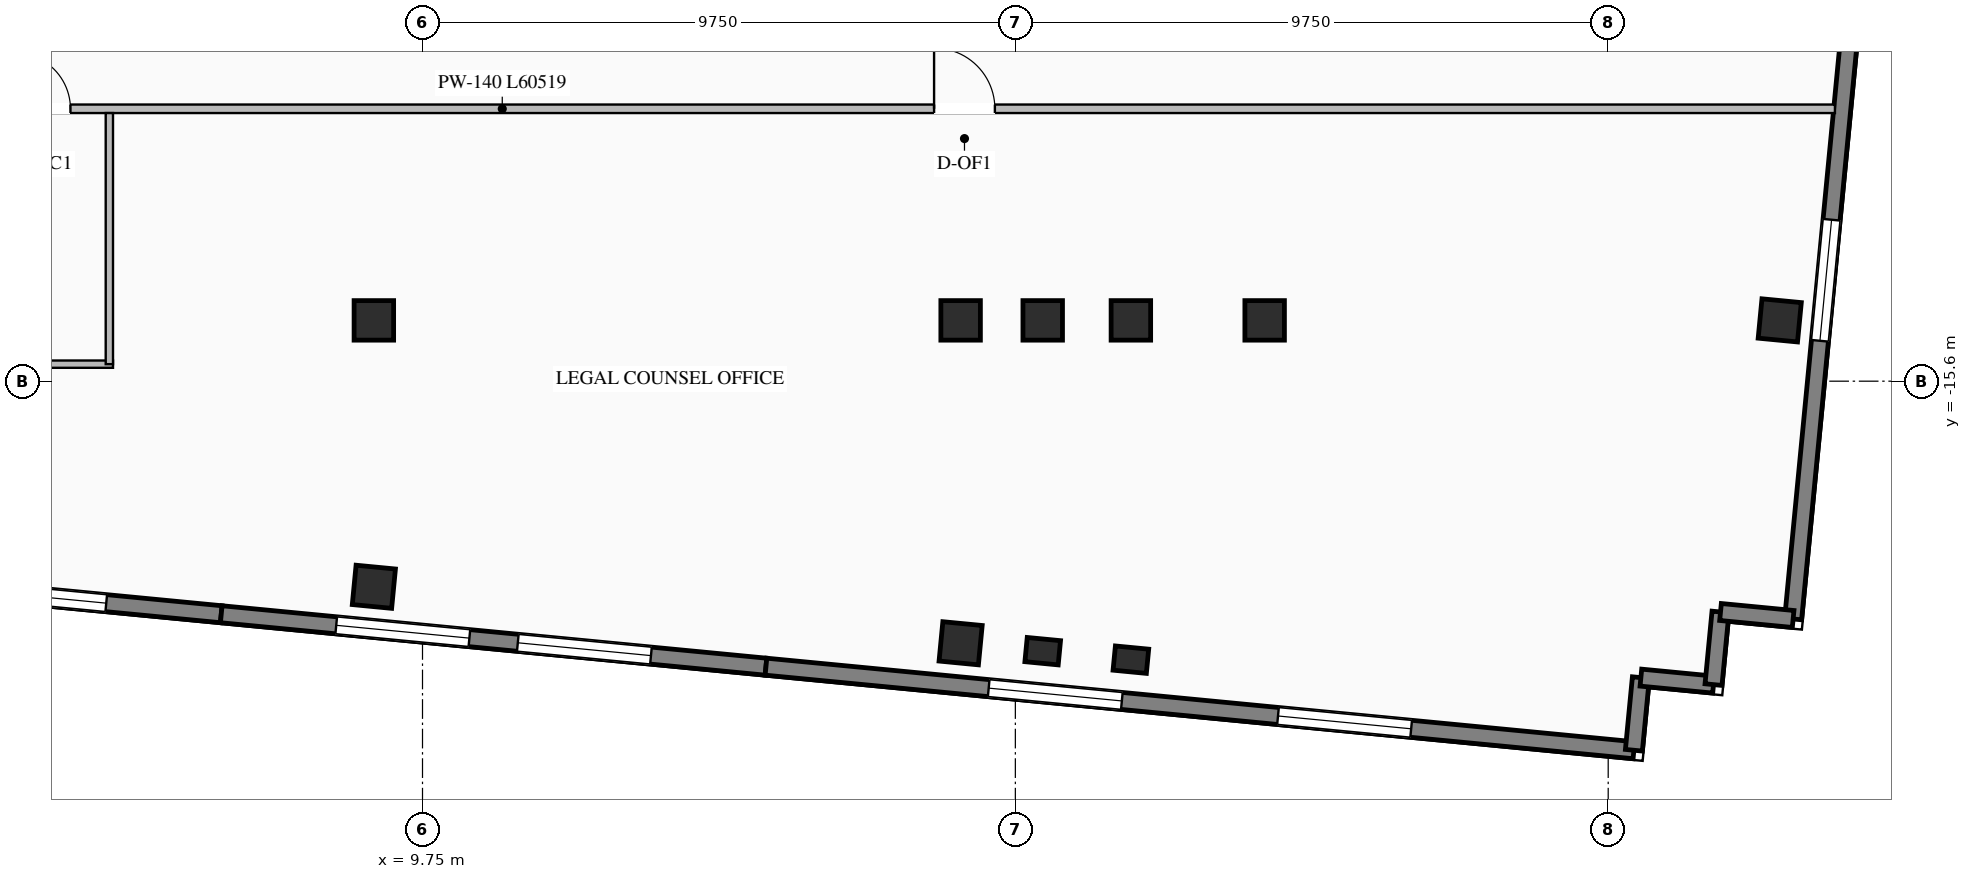
"""IFC4 building model, lengths in metres.
Left out: names, types, materials, properties, quantities, classifications, styles, units other than length and angle.
Written with IfcOpenShell. Run it as: python <this file> out.ifc"""

import sys

from ifc_helpers import new_model, si_unit, direction, frame, frame_2d, origin, origin_2d, place, context, subcontext, project, spatial, rectangle, i_section, extrude, element, fill, save


model = new_model("IFC4")
c1 = context("Model", 3, precision=1e-05, world=origin(), true_north=direction((0.0, 1.0)))
c2 = subcontext(c1, "Body", "Model", "MODEL_VIEW")
j1 = project(units=[si_unit("LENGTHUNIT", "METRE"), si_unit("PLANEANGLEUNIT", "RADIAN")], contexts=[c1])
p1 = place(None, origin())
s1 = spatial("IfcSite", under=j1, at=p1, CompositionType="ELEMENT")
p2 = place(p1, origin())
s2 = spatial("IfcBuilding", under=s1, at=p2, CompositionType="ELEMENT")
p3 = place(p2, frame((0.0, 0.0, 156.2)))
s3 = spatial("IfcBuildingStorey", under=s2, at=p3, CompositionType="ELEMENT", Elevation=156.2)
for number, where, z_axis, x_axis in (
    (1, (8.95, -14.6, 0.0), (0.0, 0.0, 1.0), (1.0, 0.0, 0.0)),
    (2, (18.6, -14.6, 0.0), (0.0, 0.0, 1.0), (1.0, 0.0, 0.0)),
    (3, (19.95, -14.6, 0.0), (0.0, 0.0, 1.0), (1.0, 0.0, 0.0)),
    (4, (21.4, -14.6, 0.0), (0.0, 0.0, 1.0), (1.0, 0.0, 0.0)),
    (5, (23.6, -14.6, 0.0), (0.0, 0.0, 1.0), (1.0, 0.0, 0.0)),
):
    element("IfcColumn", number, at=place(p3, frame(where, z_axis=z_axis, x_axis=x_axis)), inside=s3, PredefinedType="COLUMN", context=c2, shape_type="SweptSolid", body=[
        extrude(i_section(OverallWidth=0.65, OverallDepth=0.65, WebThickness=0.028, FlangeThickness=0.04, at=origin_2d()), origin(), (0.0, 0.0, 1.0), 4.2),
    ])
for number, where, z_axis, x_axis in (
    (6, (8.95, -18.981, -0.28), (0.0, 0.0, 1.0), (0.995, -0.096, 0.0)),
    (7, (18.6, -19.911, -0.28), (0.0, 0.0, 1.0), (0.995, -0.096, 0.0)),
    (8, (32.071, -14.6, -0.28), (0.0, 0.0, 1.0), (0.995, -0.096, 0.0)),
):
    element("IfcColumn", number, at=place(p3, frame(where, z_axis=z_axis, x_axis=x_axis)), inside=s3, PredefinedType="COLUMN", context=c2, shape_type="SweptSolid", body=[
        extrude(i_section(OverallWidth=0.65, OverallDepth=0.65, WebThickness=0.028, FlangeThickness=0.04, at=origin_2d()), origin(), (0.0, 0.0, 1.0), 4.48),
    ])
for number, where, z_axis, x_axis in (
    (9, (19.95, -20.041, -0.28), (0.0, 0.0, 1.0), (0.995, -0.096, 0.0)),
    (10, (21.4, -20.18, -0.28), (0.0, 0.0, 1.0), (0.995, -0.096, 0.0)),
):
    element("IfcColumn", number, at=place(p3, frame(where, z_axis=z_axis, x_axis=x_axis)), inside=s3, PredefinedType="PILASTER", context=c2, shape_type="SweptSolid", body=[
        extrude(rectangle(XDim=0.55, YDim=0.4, at=origin_2d()), origin(), (0.0, 0.0, 1.0), 4.48),
    ])
p4 = place(p3, frame((6.44, -19.433, 0.0), z_axis=(0.0, 0.0, 1.0), x_axis=(-0.995396794462, 0.09583956164, 0.0)))
e11 = element("IfcWall", 11, at=p4, inside=s3, PredefinedType="STANDARD", context=c2, shape_type="SweptSolid", body=[
    extrude(rectangle(XDim=9.0, YDim=0.28, at=frame_2d((4.5, 0.0))), origin(), (0.0, 0.0, 1.0), 4.0),
])
p5 = place(p4, frame((1.9, 0.0, 0.76)))
e12 = element("IfcOpeningElement", 12, at=p5, cuts=e11, PredefinedType="OPENING", context=c2, shape_type="SweptSolid", body=[
    extrude(rectangle(XDim=2.2, YDim=2.25, at=frame_2d((1.1, 1.125))), frame((0.0, 0.15, 0.0), z_axis=(0.0, -1.0, 0.0), x_axis=(1.0, 0.0, 0.0)), (0.0, 0.0, 1.0), 0.3),
])
p6 = place(p4, frame((4.9, 0.0, 0.76)))
e13 = element("IfcOpeningElement", 13, at=p6, cuts=e11, PredefinedType="OPENING", context=c2, shape_type="SweptSolid", body=[
    extrude(rectangle(XDim=2.2, YDim=2.25, at=frame_2d((1.1, 1.125))), frame((0.0, 0.15, 0.0), z_axis=(0.0, -1.0, 0.0), x_axis=(1.0, 0.0, 0.0)), (0.0, 0.0, 1.0), 0.3),
])
p7 = place(p3, frame((15.399, -20.296, 0.0), z_axis=(0.0, 0.0, 1.0), x_axis=(-0.995394455533, 0.09586385082, 0.0)))
e14 = element("IfcWall", 14, at=p7, inside=s3, PredefinedType="STANDARD", context=c2, shape_type="SweptSolid", body=[
    extrude(rectangle(XDim=9.0, YDim=0.28, at=frame_2d((4.5, 0.0))), origin(), (0.0, 0.0, 1.0), 4.0),
])
p8 = place(p7, frame((1.9, 0.0, 0.76)))
e15 = element("IfcOpeningElement", 15, at=p8, cuts=e14, PredefinedType="OPENING", context=c2, shape_type="SweptSolid", body=[
    extrude(rectangle(XDim=2.2, YDim=2.25, at=frame_2d((1.1, 1.125))), frame((0.0, 0.15, 0.0), z_axis=(0.0, -1.0, 0.0), x_axis=(1.0, 0.0, 0.0)), (0.0, 0.0, 1.0), 0.3),
])
p9 = place(p7, frame((4.9, 0.0, 0.76)))
e16 = element("IfcOpeningElement", 16, at=p9, cuts=e14, PredefinedType="OPENING", context=c2, shape_type="SweptSolid", body=[
    extrude(rectangle(XDim=2.2, YDim=2.25, at=frame_2d((1.1, 1.125))), frame((0.0, 0.15, 0.0), z_axis=(0.0, -1.0, 0.0), x_axis=(1.0, 0.0, 0.0)), (0.0, 0.0, 1.0), 0.3),
])
p10 = place(p3, frame((29.673, -21.67, 0.0), z_axis=(0.0, 0.0, 1.0), x_axis=(-0.995397230529, 0.095835032509, 0.0)))
e17 = element("IfcWall", 17, at=p10, inside=s3, PredefinedType="STANDARD", context=c2, shape_type="SweptSolid", body=[
    extrude(rectangle(XDim=14.34, YDim=0.28, at=frame_2d((7.17, 0.0))), origin(), (0.0, 0.0, 1.0), 4.0),
])
p11 = place(p10, frame((3.68, 0.0, 0.76)))
e18 = element("IfcOpeningElement", 18, at=p11, cuts=e17, PredefinedType="OPENING", context=c2, shape_type="SweptSolid", body=[
    extrude(rectangle(XDim=2.2, YDim=2.25, at=frame_2d((1.1, 1.125))), frame((0.0, 0.15, 0.0), z_axis=(0.0, -1.0, 0.0), x_axis=(1.0, 0.0, 0.0)), (0.0, 0.0, 1.0), 0.3),
])
p12 = place(p10, frame((8.46, 0.0, 0.76)))
e19 = element("IfcOpeningElement", 19, at=p12, cuts=e17, PredefinedType="OPENING", context=c2, shape_type="SweptSolid", body=[
    extrude(rectangle(XDim=2.2, YDim=2.25, at=frame_2d((1.1, 1.125))), frame((0.0, 0.15, 0.0), z_axis=(0.0, -1.0, 0.0), x_axis=(1.0, 0.0, 0.0)), (0.0, 0.0, 1.0), 0.3),
])
p13 = place(p3, frame((33.901, -2.798, 0.0), z_axis=(0.0, 0.0, 1.0), x_axis=(-0.095853434568, -0.99539545864, 0.0)))
e20 = element("IfcWall", 20, at=p13, inside=s3, PredefinedType="STANDARD", context=c2, shape_type="SweptSolid", body=[
    extrude(rectangle(XDim=16.79, YDim=0.28, at=frame_2d((8.395, 0.0))), origin(), (0.0, 0.0, 1.0), 4.0),
])
p14 = place(p13, frame((3.547, 0.0, 0.76)))
e21 = element("IfcOpeningElement", 21, at=p14, cuts=e20, PredefinedType="OPENING", context=c2, shape_type="SweptSolid", body=[
    extrude(rectangle(XDim=2.0, YDim=2.05, at=frame_2d((1.0, 1.025))), frame((0.0, 0.15, 0.0), z_axis=(0.0, -1.0, 0.0), x_axis=(1.0, 0.0, 0.0)), (0.0, 0.0, 1.0), 0.3),
])
p15 = place(p13, frame((10.193, 0.0, 0.76)))
e22 = element("IfcOpeningElement", 22, at=p15, cuts=e20, PredefinedType="OPENING", context=c2, shape_type="SweptSolid", body=[
    extrude(rectangle(XDim=2.0, YDim=2.05, at=frame_2d((1.0, 1.025))), frame((0.0, 0.15, 0.0), z_axis=(0.0, -1.0, 0.0), x_axis=(1.0, 0.0, 0.0)), (0.0, 0.0, 1.0), 0.3),
])
for number, where, z_axis, x_axis in (
    (23, (29.673, -21.67, 0.0), (0.0, 0.0, 1.0), (0.096, 0.995, 0.0)),
    (24, (29.788, -20.476, 0.0), (0.0, 0.0, 1.0), (0.995, -0.096, 0.0)),
):
    element("IfcWall", number, at=place(p3, frame(where, z_axis=z_axis, x_axis=x_axis)), inside=s3, PredefinedType="STANDARD", context=c2, shape_type="SweptSolid", body=[
        extrude(rectangle(XDim=1.2, YDim=0.28, at=frame_2d((0.6, 0.0))), origin(), (0.0, 0.0, 1.0), 4.0),
    ])
p16 = place(p3, frame((30.982, -20.591, 0.0), z_axis=(0.0, 0.0, 1.0), x_axis=(0.096018626938, 0.995379537303, 0.0)))
e25 = element("IfcWall", 25, at=p16, inside=s3, PredefinedType="STANDARD", context=c2, shape_type="SweptSolid", body=[
    extrude(rectangle(XDim=1.2, YDim=0.28, at=frame_2d((0.6, 0.0))), origin(), (0.0, 0.0, 1.0), 4.0),
])
p17 = place(p3, frame((31.097, -19.396, 0.0), z_axis=(0.0, 0.0, 1.0), x_axis=(0.995397091755, -0.095836473879, 0.0)))
e26 = element("IfcWall", 26, at=p17, inside=s3, PredefinedType="STANDARD", context=c2, shape_type="SweptSolid", body=[
    extrude(rectangle(XDim=1.2, YDim=0.28, at=frame_2d((0.6, 0.0))), origin(), (0.0, 0.0, 1.0), 4.0),
])
p18 = place(p3, frame((-27.54, -11.12, 0.0), z_axis=(0.0, 0.0, 1.0), x_axis=(1.0, 0.0, 0.0)))
e27 = element("IfcWall", 27, at=p18, inside=s3, PredefinedType="STANDARD", context=c2, shape_type="SweptSolid", body=[
    extrude(rectangle(XDim=60.519, YDim=0.14, at=frame_2d((30.259, 0.0))), origin(), (0.0, 0.0, 1.0), 4.0),
])
p19 = place(p18, frame((24.23, 0.0, 0.0)))
e28 = element("IfcOpeningElement", 28, at=p19, cuts=e27, PredefinedType="OPENING", context=c2, shape_type="SweptSolid", body=[
    extrude(rectangle(XDim=0.92, YDim=2.08, at=frame_2d((0.46, 1.04))), frame((0.0, 0.08, 0.0), z_axis=(0.0, -1.0, 0.0), x_axis=(1.0, 0.0, 0.0)), (0.0, 0.0, 1.0), 0.16),
])
p20 = place(p18, frame((27.73, 0.0, 0.0)))
e29 = element("IfcOpeningElement", 29, at=p20, cuts=e27, PredefinedType="OPENING", context=c2, shape_type="SweptSolid", body=[
    extrude(rectangle(XDim=0.92, YDim=2.08, at=frame_2d((0.46, 1.04))), frame((0.0, 0.08, 0.0), z_axis=(0.0, -1.0, 0.0), x_axis=(1.0, 0.0, 0.0)), (0.0, 0.0, 1.0), 0.16),
])
p21 = place(p18, frame((30.58, 0.0, 0.0)))
e30 = element("IfcOpeningElement", 30, at=p21, cuts=e27, PredefinedType="OPENING", context=c2, shape_type="SweptSolid", body=[
    extrude(rectangle(XDim=0.92, YDim=2.08, at=frame_2d((0.46, 1.04))), frame((0.0, 0.08, 0.0), z_axis=(0.0, -1.0, 0.0), x_axis=(1.0, 0.0, 0.0)), (0.0, 0.0, 1.0), 0.16),
])
p22 = place(p18, frame((11.096, 0.0, 0.0)))
e31 = element("IfcOpeningElement", 31, at=p22, cuts=e27, PredefinedType="OPENING", context=c2, shape_type="SweptSolid", body=[
    extrude(rectangle(XDim=1.0, YDim=2.08, at=frame_2d((0.5, 1.04))), frame((0.0, 0.08, 0.0), z_axis=(0.0, -1.0, 0.0), x_axis=(1.0, 0.0, 0.0)), (0.0, 0.0, 1.0), 0.16),
])
p23 = place(p18, frame((45.703, 0.0, 0.0)))
e32 = element("IfcOpeningElement", 32, at=p23, cuts=e27, PredefinedType="OPENING", context=c2, shape_type="SweptSolid", body=[
    extrude(rectangle(XDim=1.0, YDim=2.08, at=frame_2d((0.5, 1.04))), frame((0.0, 0.08, 0.0), z_axis=(0.0, -1.0, 0.0), x_axis=(1.0, 0.0, 0.0)), (0.0, 0.0, 1.0), 0.16),
])
p24 = place(p3, frame((-4.66, -15.32, 0.0), z_axis=(0.0, 0.0, 1.0), x_axis=(1.0, 0.0, 0.0)))
e33 = element("IfcWall", 33, at=p24, inside=s3, PredefinedType="STANDARD", context=c2, shape_type="SweptSolid", body=[
    extrude(rectangle(XDim=9.32, YDim=0.12, at=frame_2d((4.66, 0.0))), origin(), (0.0, 0.0, 1.0), 4.0),
])
p25 = place(p3, frame((4.6, -15.32, 0.0), z_axis=(0.0, 0.0, 1.0), x_axis=(0.0, 1.0, 0.0)))
e34 = element("IfcWall", 34, at=p25, inside=s3, PredefinedType="STANDARD", context=c2, shape_type="SweptSolid", body=[
    extrude(rectangle(XDim=4.13, YDim=0.12, at=frame_2d((2.065, 0.0))), origin(), (0.0, 0.0, 1.0), 4.0),
])
p26 = place(p5, origin())
e35 = element("IfcWindow", 35, at=p26, inside=s3, PartitioningType="DOUBLE_PANEL_VERTICAL", PredefinedType="WINDOW", context=c2, shape_type="SweptSolid", body=[
    extrude(rectangle(XDim=2.2, YDim=2.25, at=frame_2d((1.1, 1.125))), frame((0.0, 0.03, 0.0), z_axis=(0.0, -1.0, 0.0), x_axis=(1.0, 0.0, 0.0)), (0.0, 0.0, 1.0), 0.06),
])
fill(e12, e35)
p27 = place(p8, origin())
e36 = element("IfcWindow", 36, at=p27, inside=s3, PartitioningType="DOUBLE_PANEL_VERTICAL", PredefinedType="WINDOW", context=c2, shape_type="SweptSolid", body=[
    extrude(rectangle(XDim=2.2, YDim=2.25, at=frame_2d((1.1, 1.125))), frame((0.0, 0.03, 0.0), z_axis=(0.0, -1.0, 0.0), x_axis=(1.0, 0.0, 0.0)), (0.0, 0.0, 1.0), 0.06),
])
fill(e15, e36)
p28 = place(p9, origin())
e37 = element("IfcWindow", 37, at=p28, inside=s3, PartitioningType="DOUBLE_PANEL_VERTICAL", PredefinedType="WINDOW", context=c2, shape_type="SweptSolid", body=[
    extrude(rectangle(XDim=2.2, YDim=2.25, at=frame_2d((1.1, 1.125))), frame((0.0, 0.03, 0.0), z_axis=(0.0, -1.0, 0.0), x_axis=(1.0, 0.0, 0.0)), (0.0, 0.0, 1.0), 0.06),
])
fill(e16, e37)
p29 = place(p11, origin())
e38 = element("IfcWindow", 38, at=p29, inside=s3, PartitioningType="DOUBLE_PANEL_VERTICAL", PredefinedType="WINDOW", context=c2, shape_type="SweptSolid", body=[
    extrude(rectangle(XDim=2.2, YDim=2.25, at=frame_2d((1.1, 1.125))), frame((0.0, 0.03, 0.0), z_axis=(0.0, -1.0, 0.0), x_axis=(1.0, 0.0, 0.0)), (0.0, 0.0, 1.0), 0.06),
])
fill(e18, e38)
p30 = place(p12, origin())
e39 = element("IfcWindow", 39, at=p30, inside=s3, PartitioningType="DOUBLE_PANEL_VERTICAL", PredefinedType="WINDOW", context=c2, shape_type="SweptSolid", body=[
    extrude(rectangle(XDim=2.2, YDim=2.25, at=frame_2d((1.1, 1.125))), frame((0.0, 0.03, 0.0), z_axis=(0.0, -1.0, 0.0), x_axis=(1.0, 0.0, 0.0)), (0.0, 0.0, 1.0), 0.06),
])
fill(e19, e39)
p31 = place(p15, origin())
e40 = element("IfcWindow", 40, at=p31, inside=s3, PartitioningType="DOUBLE_PANEL_VERTICAL", PredefinedType="WINDOW", context=c2, shape_type="SweptSolid", body=[
    extrude(rectangle(XDim=2.0, YDim=2.05, at=frame_2d((1.0, 1.025))), frame((0.0, 0.03, 0.0), z_axis=(0.0, -1.0, 0.0), x_axis=(1.0, 0.0, 0.0)), (0.0, 0.0, 1.0), 0.06),
])
fill(e22, e40)
p32 = place(p21, origin())
e41 = element("IfcDoor", 41, at=p32, inside=s3, OperationType="SINGLE_SWING_LEFT", PredefinedType="DOOR", context=c2, shape_type="SweptSolid", body=[
    extrude(rectangle(XDim=0.92, YDim=2.08, at=frame_2d((0.46, 1.04))), frame((0.0, 0.025, 0.0), z_axis=(0.0, -1.0, 0.0), x_axis=(1.0, 0.0, 0.0)), (0.0, 0.0, 1.0), 0.05),
])
fill(e30, e41)
p33 = place(p23, origin())
e42 = element("IfcDoor", 42, at=p33, inside=s3, OperationType="SINGLE_SWING_LEFT", PredefinedType="DOOR", context=c2, shape_type="SweptSolid", body=[
    extrude(rectangle(XDim=1.0, YDim=2.08, at=frame_2d((0.5, 1.04))), frame((0.0, 0.025, 0.0), z_axis=(0.0, -1.0, 0.0), x_axis=(1.0, 0.0, 0.0)), (0.0, 0.0, 1.0), 0.05),
])
fill(e32, e42)
save(model, sys.argv[1])
